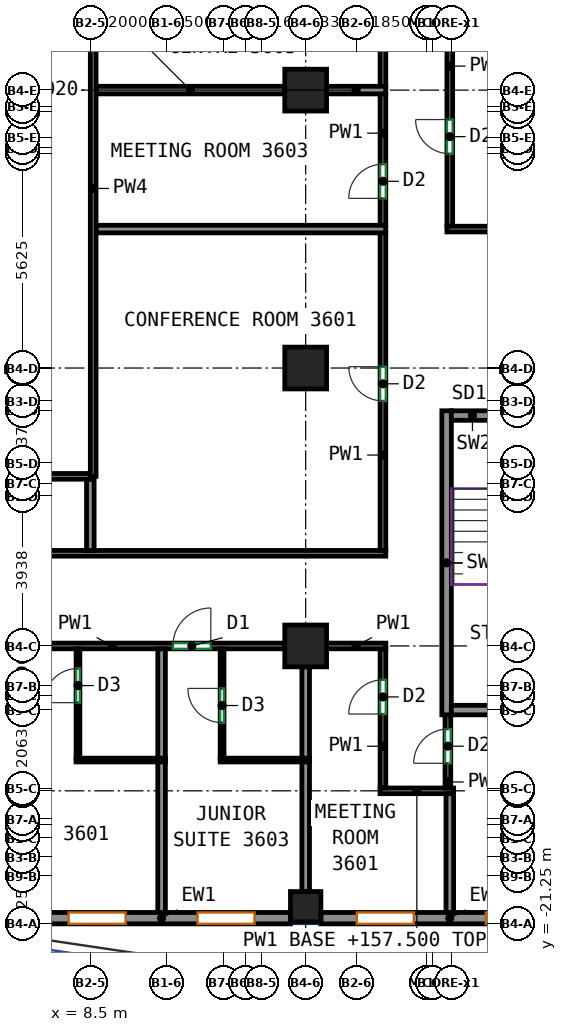
"""IFC4 building model, lengths in metres.
Left out: names, types, materials, properties, quantities, classifications, styles, units other than length and angle.
Written with IfcOpenShell. Run it as: python <this file> out.ifc"""

import sys

from ifc_helpers import new_model, si_unit, direction, frame, frame_2d, origin, origin_2d, place, context, subcontext, project, spatial, rectangle, extrude, source, transform, mapped, element, fill, save


model = new_model("IFC4")
c1 = context("Model", 3, precision=1e-05, world=origin(), true_north=direction((0.0, 1.0)))
c2 = subcontext(c1, "Body", "Model", "MODEL_VIEW")
j1 = project(units=[si_unit("LENGTHUNIT", "METRE"), si_unit("PLANEANGLEUNIT", "RADIAN")], contexts=[c1])
p1 = place(None, origin())
s1 = spatial("IfcSite", under=j1, at=p1, CompositionType="ELEMENT")
p2 = place(p1, origin())
s2 = spatial("IfcBuilding", under=s1, at=p2, CompositionType="ELEMENT")
p3 = place(p2, frame((0.0, 0.0, 157.5)))
s3 = spatial("IfcBuildingStorey", under=s2, at=p3, CompositionType="ELEMENT", Elevation=157.5)
m1 = source(origin(), c2, "Body", "SweptSolid", [
    extrude(rectangle(XDim=0.8, YDim=0.8, at=origin_2d()), origin(), (0.0, 0.0, 1.0), 3.12),
])
p4 = place(p3, frame((14.167, -20.8, 0.0), z_axis=(0.0, 0.0, 1.0), x_axis=(1.0, 0.0, 0.0)))
e1 = element("IfcColumn", 1, at=p4, inside=s3, PredefinedType="COLUMN", context=c2, shape_type="MappedRepresentation", body=[
    mapped(m1, transform((0.0, 0.0, 0.0))),
])
m2 = source(origin(), c2, "Body", "SweptSolid", [
    extrude(rectangle(XDim=1.1, YDim=1.1, at=origin_2d()), origin(), (0.0, 0.0, 1.0), 3.12),
])
for number, where, z_axis, x_axis in (
    (2, (14.167, -13.938, 0.0), (0.0, 0.0, 1.0), (1.0, 0.0, 0.0)),
    (3, (14.167, -6.625, 0.0), (0.0, 0.0, 1.0), (1.0, 0.0, 0.0)),
    (4, (14.167, 0.688, 0.0), (0.0, 0.0, 1.0), (1.0, 0.0, 0.0)),
):
    element("IfcColumn", number, at=place(p3, frame(where, z_axis=z_axis, x_axis=x_axis)), inside=s3, PredefinedType="COLUMN", context=c2, shape_type="MappedRepresentation", body=[
        mapped(m2, transform((0.0, 0.0, 0.0))),
    ])
m3 = source(origin(), c2, "Body", "SweptSolid", [
    extrude(rectangle(XDim=8.0, YDim=0.25, at=frame_2d((4.0, 0.0))), origin(), (0.0, 0.0, 1.0), 3.12),
])
p5 = place(p3, frame((17.875, -15.75, 0.0), z_axis=(0.0, 0.0, 1.0), x_axis=(0.0, 1.0, 0.0)))
e5 = element("IfcWall", 5, at=p5, inside=s3, PredefinedType="SHEAR", context=c2, shape_type="MappedRepresentation", body=[
    mapped(m3, transform((0.0, 0.0, 0.0))),
])
m4 = source(origin(), c2, "Body", "SweptSolid", [
    extrude(rectangle(XDim=3.7, YDim=0.25, at=frame_2d((1.85, 0.0))), origin(), (0.0, 0.0, 1.0), 3.12),
])
p6 = place(p3, frame((18.0, -15.625, 0.0), z_axis=(0.0, 0.0, 1.0), x_axis=(1.0, 0.0, 0.0)))
e6 = element("IfcWall", 6, at=p6, inside=s3, PredefinedType="SHEAR", context=c2, shape_type="MappedRepresentation", body=[
    mapped(m4, transform((0.0, 0.0, 0.0))),
])
p7 = place(p3, frame((18.0, -7.875, 0.0), z_axis=(0.0, 0.0, 1.0), x_axis=(1.0, 0.0, 0.0)))
e7 = element("IfcWall", 7, at=p7, inside=s3, PredefinedType="SHEAR", context=c2, shape_type="MappedRepresentation", body=[
    mapped(m4, transform((0.0, 0.0, 0.0))),
])
p8 = place(p7, frame((1.25, 0.0, 0.0)))
e8 = element("IfcOpeningElement", 8, at=p8, cuts=e7, PredefinedType="OPENING", context=c2, shape_type="SweptSolid", body=[
    extrude(rectangle(XDim=1.2, YDim=2.1, at=frame_2d((0.6, 1.05))), frame((0.0, 0.135, 0.0), z_axis=(0.0, -1.0, 0.0), x_axis=(1.0, 0.0, 0.0)), (0.0, 0.0, 1.0), 0.27),
])
m5 = source(origin(), c2, "Body", "SweptSolid", [
    extrude(rectangle(XDim=6.783, YDim=0.3, at=frame_2d((3.392, 0.0))), origin(), (0.0, 0.0, 1.0), 3.12),
])
p9 = place(p3, frame((6.983, -21.1, 0.0), z_axis=(0.0, 0.0, 1.0), x_axis=(1.0, 0.0, 0.0)))
e9 = element("IfcWall", 9, at=p9, inside=s3, PredefinedType="SOLIDWALL", context=c2, shape_type="MappedRepresentation", body=[
    mapped(m5, transform((0.0, 0.0, 0.0))),
])
p10 = place(p9, frame((0.946, 0.0, 0.85)))
e10 = element("IfcOpeningElement", 10, at=p10, cuts=e9, PredefinedType="OPENING", context=c2, shape_type="SweptSolid", body=[
    extrude(rectangle(XDim=1.5, YDim=1.95, at=frame_2d((0.75, 0.975))), frame((0.0, 0.16, 0.0), z_axis=(0.0, -1.0, 0.0), x_axis=(1.0, 0.0, 0.0)), (0.0, 0.0, 1.0), 0.32),
])
p11 = place(p9, frame((4.338, 0.0, 0.85)))
e11 = element("IfcOpeningElement", 11, at=p11, cuts=e9, PredefinedType="OPENING", context=c2, shape_type="SweptSolid", body=[
    extrude(rectangle(XDim=1.5, YDim=1.95, at=frame_2d((0.75, 0.975))), frame((0.0, 0.16, 0.0), z_axis=(0.0, -1.0, 0.0), x_axis=(1.0, 0.0, 0.0)), (0.0, 0.0, 1.0), 0.32),
])
m6 = source(origin(), c2, "Body", "SweptSolid", [
    extrude(rectangle(XDim=6.783, YDim=0.3, at=frame_2d((3.392, 0.0))), origin(), (0.0, 0.0, 1.0), 3.12),
])
p12 = place(p3, frame((14.567, -21.1, 0.0), z_axis=(0.0, 0.0, 1.0), x_axis=(1.0, 0.0, 0.0)))
e12 = element("IfcWall", 12, at=p12, inside=s3, PredefinedType="SOLIDWALL", context=c2, shape_type="MappedRepresentation", body=[
    mapped(m6, transform((0.0, 0.0, 0.0))),
])
p13 = place(p12, frame((0.946, 0.0, 0.85)))
e13 = element("IfcOpeningElement", 13, at=p13, cuts=e12, PredefinedType="OPENING", context=c2, shape_type="SweptSolid", body=[
    extrude(rectangle(XDim=1.5, YDim=1.95, at=frame_2d((0.75, 0.975))), frame((0.0, 0.16, 0.0), z_axis=(0.0, -1.0, 0.0), x_axis=(1.0, 0.0, 0.0)), (0.0, 0.0, 1.0), 0.32),
])
p14 = place(p12, frame((4.337, 0.0, 0.85)))
e14 = element("IfcOpeningElement", 14, at=p14, cuts=e12, PredefinedType="OPENING", context=c2, shape_type="SweptSolid", body=[
    extrude(rectangle(XDim=1.5, YDim=1.95, at=frame_2d((0.75, 0.975))), frame((0.0, 0.16, 0.0), z_axis=(0.0, -1.0, 0.0), x_axis=(1.0, 0.0, 0.0)), (0.0, 0.0, 1.0), 0.32),
])
p15 = place(p3, frame((7.133, -13.938, 0.0), z_axis=(0.0, 0.0, 1.0), x_axis=(1.0, 0.0, 0.0)))
e15 = element("IfcWall", 15, at=p15, inside=s3, PredefinedType="PARTITIONING", context=c2, shape_type="SweptSolid", body=[
    extrude(rectangle(XDim=6.484, YDim=0.15, at=frame_2d((3.242, 0.0))), origin(), (0.0, 0.0, 1.0), 3.12),
])
p16 = place(p15, frame((3.538, 0.0, 0.0)))
e16 = element("IfcOpeningElement", 16, at=p16, cuts=e15, PredefinedType="OPENING", context=c2, shape_type="SweptSolid", body=[
    extrude(rectangle(XDim=1.0, YDim=2.1, at=frame_2d((0.5, 1.05))), frame((0.0, 0.085, 0.0), z_axis=(0.0, -1.0, 0.0), x_axis=(1.0, 0.0, 0.0)), (0.0, 0.0, 1.0), 0.17),
])
p17 = place(p3, frame((16.125, -17.75, 0.0), z_axis=(0.0, 0.0, 1.0), x_axis=(1.0, 0.0, 0.0)))
e17 = element("IfcWall", 17, at=p17, inside=s3, PredefinedType="PARTITIONING", context=c2, shape_type="SweptSolid", body=[
    extrude(rectangle(XDim=1.934, YDim=0.15, at=frame_2d((0.967, 0.0))), origin(), (0.0, 0.0, 1.0), 2.52),
])
p18 = place(p3, frame((16.2, -17.675, 0.0), z_axis=(0.0, 0.0, 1.0), x_axis=(0.0, 1.0, 0.0)))
e18 = element("IfcWall", 18, at=p18, inside=s3, PredefinedType="PARTITIONING", context=c2, shape_type="SweptSolid", body=[
    extrude(rectangle(XDim=3.662, YDim=0.15, at=frame_2d((1.831, 0.0))), origin(), (0.0, 0.0, 1.0), 3.12),
])
p19 = place(p18, frame((1.946, 0.0, 0.0)))
e19 = element("IfcOpeningElement", 19, at=p19, cuts=e18, PredefinedType="OPENING", context=c2, shape_type="SweptSolid", body=[
    extrude(rectangle(XDim=0.9, YDim=2.1, at=frame_2d((0.45, 1.05))), frame((0.0, 0.085, 0.0), z_axis=(0.0, -1.0, 0.0), x_axis=(1.0, 0.0, 0.0)), (0.0, 0.0, 1.0), 0.17),
])
p20 = place(p3, frame((14.717, -13.938, 0.0), z_axis=(0.0, 0.0, 1.0), x_axis=(1.0, 0.0, 0.0)))
e20 = element("IfcWall", 20, at=p20, inside=s3, PredefinedType="PARTITIONING", context=c2, shape_type="SweptSolid", body=[
    extrude(rectangle(XDim=1.558, YDim=0.15, at=frame_2d((0.779, 0.0))), origin(), (0.0, 0.0, 1.0), 3.12),
])
p21 = place(p3, frame((17.909, -17.675, 0.0), z_axis=(0.0, 0.0, 1.0), x_axis=(0.0, 1.0, 0.0)))
e21 = element("IfcWall", 21, at=p21, inside=s3, PredefinedType="PARTITIONING", context=c2, shape_type="SweptSolid", body=[
    extrude(rectangle(XDim=1.975, YDim=0.15, at=frame_2d((0.988, 0.0))), origin(), (0.0, 0.0, 1.0), 3.12),
])
p22 = place(p21, frame((0.65, 0.0, 0.0)))
e22 = element("IfcOpeningElement", 22, at=p22, cuts=e21, PredefinedType="OPENING", context=c2, shape_type="SweptSolid", body=[
    extrude(rectangle(XDim=0.9, YDim=2.1, at=frame_2d((0.45, 1.05))), frame((0.0, 0.085, 0.0), z_axis=(0.0, -1.0, 0.0), x_axis=(1.0, 0.0, 0.0)), (0.0, 0.0, 1.0), 0.17),
])
p23 = place(p3, frame((17.959, -2.894, 0.0), z_axis=(0.0, 0.0, 1.0), x_axis=(0.0, 1.0, 0.0)))
e23 = element("IfcWall", 23, at=p23, inside=s3, PredefinedType="PARTITIONING", context=c2, shape_type="SweptSolid", body=[
    extrude(rectangle(XDim=6.019, YDim=0.15, at=frame_2d((3.01, 0.0))), origin(), (0.0, 0.0, 1.0), 3.12),
])
p24 = place(p23, frame((1.907, 0.0, 0.0)))
e24 = element("IfcOpeningElement", 24, at=p24, cuts=e23, PredefinedType="OPENING", context=c2, shape_type="SweptSolid", body=[
    extrude(rectangle(XDim=0.9, YDim=2.1, at=frame_2d((0.45, 1.05))), frame((0.0, 0.085, 0.0), z_axis=(0.0, -1.0, 0.0), x_axis=(1.0, 0.0, 0.0)), (0.0, 0.0, 1.0), 0.17),
])
p25 = place(p3, frame((21.751, -2.969, 0.0), z_axis=(0.0, 0.0, 1.0), x_axis=(-1.0, 0.0, 0.0)))
e25 = element("IfcWall", 25, at=p25, inside=s3, PredefinedType="PARTITIONING", context=c2, shape_type="SweptSolid", body=[
    extrude(rectangle(XDim=3.867, YDim=0.15, at=frame_2d((1.934, 0.0))), origin(), (0.0, 0.0, 1.0), 3.12),
])
p26 = place(p3, frame((-12.075, -11.5, 0.0), z_axis=(0.0, 0.0, 1.0), x_axis=(1.0, 0.0, 0.0)))
e26 = element("IfcWall", 26, at=p26, inside=s3, PredefinedType="PARTITIONING", context=c2, shape_type="SweptSolid", body=[
    extrude(rectangle(XDim=28.35, YDim=0.15, at=frame_2d((14.175, 0.0))), origin(), (0.0, 0.0, 1.0), 3.12),
])
p27 = place(p26, frame((18.584, 0.0, 0.0)))
e27 = element("IfcOpeningElement", 27, at=p27, cuts=e26, PredefinedType="OPENING", context=c2, shape_type="SweptSolid", body=[
    extrude(rectangle(XDim=0.9, YDim=2.1, at=frame_2d((0.45, 1.05))), frame((0.0, 0.085, 0.0), z_axis=(0.0, -1.0, 0.0), x_axis=(1.0, 0.0, 0.0)), (0.0, 0.0, 1.0), 0.17),
])
p28 = place(p3, frame((16.2, -11.425, 0.0), z_axis=(0.0, 0.0, 1.0), x_axis=(0.0, 1.0, 0.0)))
e28 = element("IfcWall", 28, at=p28, inside=s3, PredefinedType="PARTITIONING", context=c2, shape_type="SweptSolid", body=[
    extrude(rectangle(XDim=8.366, YDim=0.15, at=frame_2d((4.183, 0.0))), origin(), (0.0, 0.0, 1.0), 3.12),
])
p29 = place(p28, frame((3.935, 0.0, 0.0)))
e29 = element("IfcOpeningElement", 29, at=p29, cuts=e28, PredefinedType="OPENING", context=c2, shape_type="SweptSolid", body=[
    extrude(rectangle(XDim=0.9, YDim=2.1, at=frame_2d((0.45, 1.05))), frame((0.0, 0.085, 0.0), z_axis=(0.0, -1.0, 0.0), x_axis=(1.0, 0.0, 0.0)), (0.0, 0.0, 1.0), 0.17),
])
p30 = place(p3, frame((16.2, -2.879, 0.0), z_axis=(0.0, 0.0, 1.0), x_axis=(0.0, 1.0, 0.0)))
e30 = element("IfcWall", 30, at=p30, inside=s3, PredefinedType="PARTITIONING", context=c2, shape_type="SweptSolid", body=[
    extrude(rectangle(XDim=3.477, YDim=0.15, at=frame_2d((1.738, 0.0))), origin(), (0.0, 0.0, 1.0), 3.12),
])
p31 = place(p30, frame((0.718, 0.0, 0.0)))
e31 = element("IfcOpeningElement", 31, at=p31, cuts=e30, PredefinedType="OPENING", context=c2, shape_type="SweptSolid", body=[
    extrude(rectangle(XDim=0.9, YDim=2.1, at=frame_2d((0.45, 1.05))), frame((0.0, 0.085, 0.0), z_axis=(0.0, -1.0, 0.0), x_axis=(1.0, 0.0, 0.0)), (0.0, 0.0, 1.0), 0.17),
])
p32 = place(p3, frame((16.2, 0.778, 0.0), z_axis=(0.0, 0.0, 1.0), x_axis=(0.0, 1.0, 0.0)))
e32 = element("IfcWall", 32, at=p32, inside=s3, PredefinedType="PARTITIONING", context=c2, shape_type="SweptSolid", body=[
    extrude(rectangle(XDim=2.347, YDim=0.15, at=frame_2d((1.173, 0.0))), origin(), (0.0, 0.0, 1.0), 3.12),
])
p33 = place(p3, frame((8.175, -16.89, 0.0), z_axis=(0.0, 0.0, 1.0), x_axis=(0.0, 1.0, 0.0)))
e33 = element("IfcWall", 33, at=p33, inside=s3, PredefinedType="PARTITIONING", context=c2, shape_type="SweptSolid", body=[
    extrude(rectangle(XDim=2.875, YDim=0.1, at=frame_2d((1.438, 0.0))), origin(), (0.0, 0.0, 1.0), 3.12),
])
p34 = place(p33, frame((1.46, 0.0, 0.0)))
e34 = element("IfcOpeningElement", 34, at=p34, cuts=e33, PredefinedType="OPENING", context=c2, shape_type="SweptSolid", body=[
    extrude(rectangle(XDim=0.9, YDim=2.1, at=frame_2d((0.45, 1.05))), frame((0.0, 0.06, 0.0), z_axis=(0.0, -1.0, 0.0), x_axis=(1.0, 0.0, 0.0)), (0.0, 0.0, 1.0), 0.12),
])
p35 = place(p3, frame((8.125, -16.94, 0.0), z_axis=(0.0, 0.0, 1.0), x_axis=(1.0, 0.0, 0.0)))
e35 = element("IfcWall", 35, at=p35, inside=s3, PredefinedType="PARTITIONING", context=c2, shape_type="SweptSolid", body=[
    extrude(rectangle(XDim=2.35, YDim=0.1, at=frame_2d((1.175, 0.0))), origin(), (0.0, 0.0, 1.0), 3.12),
])
p36 = place(p3, frame((10.375, -21.0, 0.0), z_axis=(0.0, 0.0, 1.0), x_axis=(0.0, 1.0, 0.0)))
e36 = element("IfcWall", 36, at=p36, inside=s3, PredefinedType="PARTITIONING", context=c2, shape_type="SweptSolid", body=[
    extrude(rectangle(XDim=4.01, YDim=0.2, at=frame_2d((2.005, 0.0))), origin(), (0.0, 0.0, 1.0), 3.12),
])
p37 = place(p3, frame((10.375, -16.89, 0.0), z_axis=(0.0, 0.0, 1.0), x_axis=(0.0, 1.0, 0.0)))
e37 = element("IfcWall", 37, at=p37, inside=s3, PredefinedType="PARTITIONING", context=c2, shape_type="SweptSolid", body=[
    extrude(rectangle(XDim=2.875, YDim=0.2, at=frame_2d((1.438, 0.0))), origin(), (0.0, 0.0, 1.0), 3.12),
])
p38 = place(p3, frame((11.967, -16.89, 0.0), z_axis=(0.0, 0.0, 1.0), x_axis=(0.0, 1.0, 0.0)))
e38 = element("IfcWall", 38, at=p38, inside=s3, PredefinedType="PARTITIONING", context=c2, shape_type="SweptSolid", body=[
    extrude(rectangle(XDim=2.875, YDim=0.1, at=frame_2d((1.438, 0.0))), origin(), (0.0, 0.0, 1.0), 3.12),
])
p39 = place(p38, frame((0.935, 0.0, 0.0)))
e39 = element("IfcOpeningElement", 39, at=p39, cuts=e38, PredefinedType="OPENING", context=c2, shape_type="SweptSolid", body=[
    extrude(rectangle(XDim=0.9, YDim=2.1, at=frame_2d((0.45, 1.05))), frame((0.0, 0.06, 0.0), z_axis=(0.0, -1.0, 0.0), x_axis=(1.0, 0.0, 0.0)), (0.0, 0.0, 1.0), 0.12),
])
p40 = place(p3, frame((11.917, -16.94, 0.0), z_axis=(0.0, 0.0, 1.0), x_axis=(1.0, 0.0, 0.0)))
e40 = element("IfcWall", 40, at=p40, inside=s3, PredefinedType="PARTITIONING", context=c2, shape_type="SweptSolid", body=[
    extrude(rectangle(XDim=2.35, YDim=0.1, at=frame_2d((1.175, 0.0))), origin(), (0.0, 0.0, 1.0), 3.12),
])
p41 = place(p3, frame((14.167, -20.4, 0.0), z_axis=(0.0, 0.0, 1.0), x_axis=(0.0, 1.0, 0.0)))
e41 = element("IfcWall", 41, at=p41, inside=s3, PredefinedType="PARTITIONING", context=c2, shape_type="SweptSolid", body=[
    extrude(rectangle(XDim=3.41, YDim=0.2, at=frame_2d((1.705, 0.0))), origin(), (0.0, 0.0, 1.0), 3.12),
])
p42 = place(p3, frame((14.167, -16.89, 0.0), z_axis=(0.0, 0.0, 1.0), x_axis=(0.0, 1.0, 0.0)))
e42 = element("IfcWall", 42, at=p42, inside=s3, PredefinedType="PARTITIONING", context=c2, shape_type="SweptSolid", body=[
    extrude(rectangle(XDim=2.402, YDim=0.2, at=frame_2d((1.201, 0.0))), origin(), (0.0, 0.0, 1.0), 3.12),
])
p43 = place(p3, frame((17.959, -21.0, 0.0), z_axis=(0.0, 0.0, 1.0), x_axis=(0.0, 1.0, 0.0)))
e43 = element("IfcWall", 43, at=p43, inside=s3, PredefinedType="PARTITIONING", context=c2, shape_type="SweptSolid", body=[
    extrude(rectangle(XDim=3.173, YDim=0.2, at=frame_2d((1.586, 0.0))), origin(), (0.0, 0.0, 1.0), 3.12),
])
p44 = place(p3, frame((8.5, -11.423, 0.0), z_axis=(0.0, 0.0, 1.0), x_axis=(0.0, 1.0, 0.0)))
e44 = element("IfcWall", 44, at=p44, inside=s3, PredefinedType="PARTITIONING", context=c2, shape_type="SweptSolid", body=[
    extrude(rectangle(XDim=1.873, YDim=0.2, at=frame_2d((0.937, 0.0))), origin(), (0.0, 0.0, 1.0), 3.12),
])
p45 = place(p3, frame((8.65, -2.969, 0.0), z_axis=(0.0, 0.0, 1.0), x_axis=(1.0, 0.0, 0.0)))
e45 = element("IfcWall", 45, at=p45, inside=s3, PredefinedType="PARTITIONING", context=c2, shape_type="SweptSolid", body=[
    extrude(rectangle(XDim=7.623, YDim=0.2, at=frame_2d((3.812, 0.0))), origin(), (0.0, 0.0, 1.0), 3.12),
])
p46 = place(p3, frame((14.717, 0.688, 0.0), z_axis=(0.0, 0.0, 1.0), x_axis=(1.0, 0.0, 0.0)))
e46 = element("IfcWall", 46, at=p46, inside=s3, PredefinedType="PARTITIONING", context=c2, shape_type="SweptSolid", body=[
    extrude(rectangle(XDim=1.556, YDim=0.2, at=frame_2d((0.778, 0.0))), origin(), (0.0, 0.0, 1.0), 2.52),
])
p47 = place(p3, frame((8.65, 0.688, 0.0), z_axis=(0.0, 0.0, 1.0), x_axis=(1.0, 0.0, 0.0)))
e47 = element("IfcWall", 47, at=p47, inside=s3, PredefinedType="PARTITIONING", context=c2, shape_type="SweptSolid", body=[
    extrude(rectangle(XDim=4.967, YDim=0.2, at=frame_2d((2.483, 0.0))), origin(), (0.0, 0.0, 1.0), 2.52),
])
p48 = place(p3, frame((8.5, -9.475, 0.0), z_axis=(0.0, 0.0, 1.0), x_axis=(-1.0, 0.0, 0.0)))
e48 = element("IfcWall", 48, at=p48, inside=s3, PredefinedType="PARTITIONING", context=c2, shape_type="SweptSolid", body=[
    extrude(rectangle(XDim=15.075, YDim=0.15, at=frame_2d((7.538, 0.0))), origin(), (0.0, 0.0, 1.0), 3.12),
])
p49 = place(p3, frame((8.575, 5.675, 0.0), z_axis=(0.0, 0.0, 1.0), x_axis=(0.0, -1.0, 0.0)))
e49 = element("IfcWall", 49, at=p49, inside=s3, PredefinedType="PARTITIONING", context=c2, shape_type="SweptSolid", body=[
    extrude(rectangle(XDim=15.15, YDim=0.15, at=frame_2d((7.575, 0.0))), origin(), (0.0, 0.0, 1.0), 3.12),
])
p50 = place(p10, origin())
e50 = element("IfcWindow", 50, at=p50, inside=s3, PartitioningType="SINGLE_PANEL", PredefinedType="WINDOW", context=c2, shape_type="SweptSolid", body=[
    extrude(rectangle(XDim=1.5, YDim=1.95, at=frame_2d((0.75, 0.975))), frame((0.0, 0.03, 0.0), z_axis=(0.0, -1.0, 0.0), x_axis=(1.0, 0.0, 0.0)), (0.0, 0.0, 1.0), 0.06),
])
fill(e10, e50)
p51 = place(p11, origin())
e51 = element("IfcWindow", 51, at=p51, inside=s3, PartitioningType="SINGLE_PANEL", PredefinedType="WINDOW", context=c2, shape_type="SweptSolid", body=[
    extrude(rectangle(XDim=1.5, YDim=1.95, at=frame_2d((0.75, 0.975))), frame((0.0, 0.03, 0.0), z_axis=(0.0, -1.0, 0.0), x_axis=(1.0, 0.0, 0.0)), (0.0, 0.0, 1.0), 0.06),
])
fill(e11, e51)
p52 = place(p13, origin())
e52 = element("IfcWindow", 52, at=p52, inside=s3, PartitioningType="SINGLE_PANEL", PredefinedType="WINDOW", context=c2, shape_type="SweptSolid", body=[
    extrude(rectangle(XDim=1.5, YDim=1.95, at=frame_2d((0.75, 0.975))), frame((0.0, 0.03, 0.0), z_axis=(0.0, -1.0, 0.0), x_axis=(1.0, 0.0, 0.0)), (0.0, 0.0, 1.0), 0.06),
])
fill(e13, e52)
p53 = place(p14, origin())
e53 = element("IfcWindow", 53, at=p53, inside=s3, PartitioningType="SINGLE_PANEL", PredefinedType="WINDOW", context=c2, shape_type="SweptSolid", body=[
    extrude(rectangle(XDim=1.5, YDim=1.95, at=frame_2d((0.75, 0.975))), frame((0.0, 0.03, 0.0), z_axis=(0.0, -1.0, 0.0), x_axis=(1.0, 0.0, 0.0)), (0.0, 0.0, 1.0), 0.06),
])
fill(e14, e53)
p54 = place(p22, origin())
e54 = element("IfcDoor", 54, at=p54, inside=s3, OperationType="SINGLE_SWING_LEFT", PredefinedType="DOOR", context=c2, shape_type="SweptSolid", body=[
    extrude(rectangle(XDim=0.9, YDim=2.1, at=frame_2d((0.45, 1.05))), frame((0.0, 0.025, 0.0), z_axis=(0.0, -1.0, 0.0), x_axis=(1.0, 0.0, 0.0)), (0.0, 0.0, 1.0), 0.05),
])
fill(e22, e54)
p55 = place(p39, origin())
e55 = element("IfcDoor", 55, at=p55, inside=s3, OperationType="SINGLE_SWING_RIGHT", PredefinedType="DOOR", context=c2, shape_type="SweptSolid", body=[
    extrude(rectangle(XDim=0.9, YDim=2.1, at=frame_2d((0.45, 1.05))), frame((0.0, 0.025, 0.0), z_axis=(0.0, -1.0, 0.0), x_axis=(1.0, 0.0, 0.0)), (0.0, 0.0, 1.0), 0.05),
])
fill(e39, e55)
p56 = place(p19, origin())
e56 = element("IfcDoor", 56, at=p56, inside=s3, OperationType="SINGLE_SWING_LEFT", PredefinedType="DOOR", context=c2, shape_type="SweptSolid", body=[
    extrude(rectangle(XDim=0.9, YDim=2.1, at=frame_2d((0.45, 1.05))), frame((0.0, 0.025, 0.0), z_axis=(0.0, -1.0, 0.0), x_axis=(1.0, 0.0, 0.0)), (0.0, 0.0, 1.0), 0.05),
])
fill(e19, e56)
p57 = place(p34, origin())
e57 = element("IfcDoor", 57, at=p57, inside=s3, OperationType="SINGLE_SWING_LEFT", PredefinedType="DOOR", context=c2, shape_type="SweptSolid", body=[
    extrude(rectangle(XDim=0.9, YDim=2.1, at=frame_2d((0.45, 1.05))), frame((0.0, 0.025, 0.0), z_axis=(0.0, -1.0, 0.0), x_axis=(1.0, 0.0, 0.0)), (0.0, 0.0, 1.0), 0.05),
])
fill(e34, e57)
p58 = place(p16, origin())
e58 = element("IfcDoor", 58, at=p58, inside=s3, OperationType="SINGLE_SWING_RIGHT", PredefinedType="DOOR", context=c2, shape_type="SweptSolid", body=[
    extrude(rectangle(XDim=1.0, YDim=2.1, at=frame_2d((0.5, 1.05))), frame((0.0, 0.025, 0.0), z_axis=(0.0, -1.0, 0.0), x_axis=(1.0, 0.0, 0.0)), (0.0, 0.0, 1.0), 0.05),
])
fill(e16, e58)
p59 = place(p29, origin())
e59 = element("IfcDoor", 59, at=p59, inside=s3, OperationType="SINGLE_SWING_RIGHT", PredefinedType="DOOR", context=c2, shape_type="SweptSolid", body=[
    extrude(rectangle(XDim=0.9, YDim=2.1, at=frame_2d((0.45, 1.05))), frame((0.0, 0.025, 0.0), z_axis=(0.0, -1.0, 0.0), x_axis=(1.0, 0.0, 0.0)), (0.0, 0.0, 1.0), 0.05),
])
fill(e29, e59)
p60 = place(p31, origin())
e60 = element("IfcDoor", 60, at=p60, inside=s3, OperationType="SINGLE_SWING_LEFT", PredefinedType="DOOR", context=c2, shape_type="SweptSolid", body=[
    extrude(rectangle(XDim=0.9, YDim=2.1, at=frame_2d((0.45, 1.05))), frame((0.0, 0.025, 0.0), z_axis=(0.0, -1.0, 0.0), x_axis=(1.0, 0.0, 0.0)), (0.0, 0.0, 1.0), 0.05),
])
fill(e31, e60)
p61 = place(p24, origin())
e61 = element("IfcDoor", 61, at=p61, inside=s3, OperationType="SINGLE_SWING_RIGHT", PredefinedType="DOOR", context=c2, shape_type="SweptSolid", body=[
    extrude(rectangle(XDim=0.9, YDim=2.1, at=frame_2d((0.45, 1.05))), frame((0.0, 0.025, 0.0), z_axis=(0.0, -1.0, 0.0), x_axis=(1.0, 0.0, 0.0)), (0.0, 0.0, 1.0), 0.05),
])
fill(e24, e61)
save(model, sys.argv[1])
